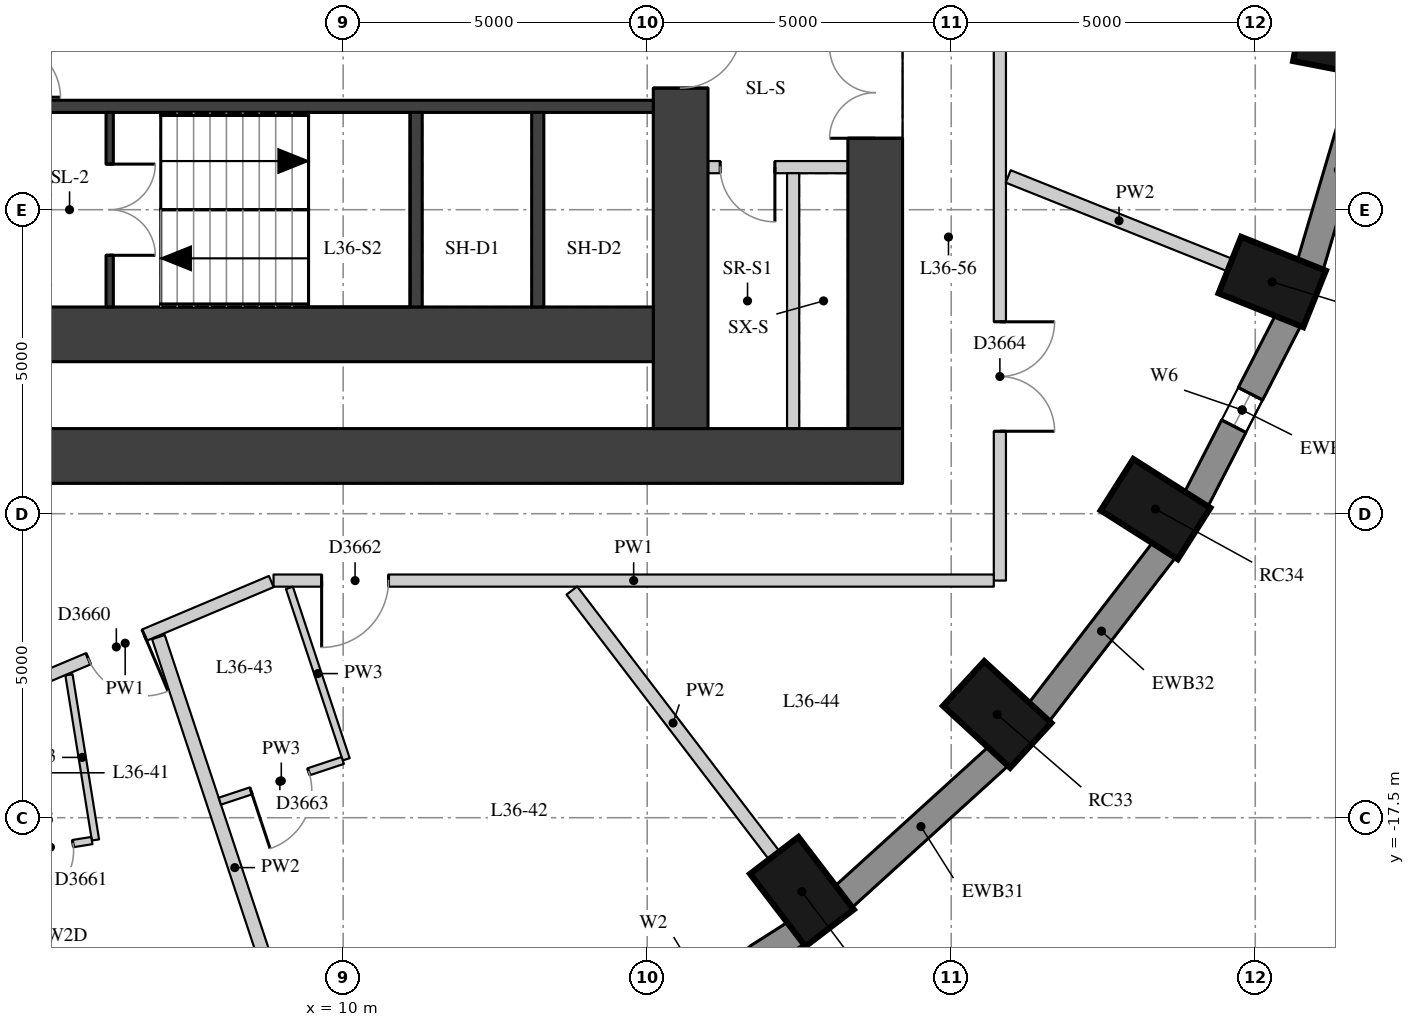
"""IFC4 building model, lengths in metres.
Left out: names, types, materials, properties, quantities, classifications, styles, units other than length and angle.
Written with IfcOpenShell. Run it as: python <this file> out.ifc"""

import sys

from ifc_helpers import new_model, si_unit, direction, frame, frame_2d, origin, origin_2d, place, context, subcontext, project, spatial, rectangle, extrude, element, fill, save


model = new_model("IFC4")
c1 = context("Model", 3, precision=1e-05, world=origin(), true_north=direction((0.0, 1.0)))
c2 = subcontext(c1, "Body", "Model", "MODEL_VIEW")
j1 = project(units=[si_unit("LENGTHUNIT", "METRE"), si_unit("PLANEANGLEUNIT", "RADIAN")], contexts=[c1])
p1 = place(None, origin())
s1 = spatial("IfcSite", under=j1, at=p1, CompositionType="ELEMENT")
p2 = place(p1, origin())
s2 = spatial("IfcBuilding", under=s1, at=p2, CompositionType="ELEMENT")
p3 = place(p2, frame((0.0, 0.0, 128.5)))
s3 = spatial("IfcBuildingStorey", under=s2, at=p3, CompositionType="ELEMENT", Elevation=128.5)
for number, where, z_axis, x_axis in (
    (1, (17.545, -18.717, 0.0), (0.0, 0.0, 1.0), (0.607, -0.795, 0.0)),
    (2, (20.755, -15.802, 0.0), (0.0, 0.0, 1.0), (0.735, -0.678, 0.0)),
    (3, (23.36, -12.425, 0.0), (0.0, 0.0, 1.0), (0.845, -0.536, 0.0)),
    (4, (25.279, -8.689, 0.0), (0.0, 0.0, 1.0), (0.929, -0.371, 0.0)),
    (5, (26.454, -4.707, 0.0), (0.0, 0.0, 1.0), (0.982, -0.19, 0.0)),
):
    element("IfcColumn", number, at=place(p3, frame(where, z_axis=z_axis, x_axis=x_axis)), inside=s3, PredefinedType="COLUMN", context=c2, shape_type="SweptSolid", body=[
        extrude(rectangle(XDim=1.5, YDim=1.0, at=origin_2d()), origin(), (0.0, 0.0, 1.0), 3.3),
    ])
p4 = place(p3, frame((14.475, -21.287, 0.0), z_axis=(0.0, 0.0, 1.0), x_axis=(0.843911841423, 0.536481876587, 0.0)))
e6 = element("IfcWall", 6, at=p4, inside=s3, PredefinedType="SOLIDWALL", context=c2, shape_type="SweptSolid", body=[
    extrude(rectangle(XDim=3.532, YDim=0.45, at=frame_2d((1.766, 0.0))), origin(), (0.0, 0.0, 1.0), 3.02),
])
p5 = place(p4, frame((0.766, 0.0, 0.4)))
e7 = element("IfcOpeningElement", 7, at=p5, cuts=e6, PredefinedType="OPENING", context=c2, shape_type="SweptSolid", body=[
    extrude(rectangle(XDim=2.0, YDim=1.75, at=frame_2d((1.0, 0.875))), frame((0.0, 0.235, 0.0), z_axis=(0.0, -1.0, 0.0), x_axis=(1.0, 0.0, 0.0)), (0.0, 0.0, 1.0), 0.47),
])
p6 = place(p3, frame((18.219, -18.81, 0.0), z_axis=(0.0, 0.0, 1.0), x_axis=(0.740364106106, 0.672206062446, 0.0)))
e8 = element("IfcWall", 8, at=p6, inside=s3, PredefinedType="SOLIDWALL", context=c2, shape_type="SweptSolid", body=[
    extrude(rectangle(XDim=3.464, YDim=0.45, at=frame_2d((1.732, 0.0))), origin(), (0.0, 0.0, 1.0), 3.02),
])
p7 = place(p3, frame((21.435, -15.775, 0.0), z_axis=(0.0, 0.0, 1.0), x_axis=(0.610693945156, 0.791866721961, 0.0)))
e9 = element("IfcWall", 9, at=p7, inside=s3, PredefinedType="SOLIDWALL", context=c2, shape_type="SweptSolid", body=[
    extrude(rectangle(XDim=3.395, YDim=0.45, at=frame_2d((1.697, 0.0))), origin(), (0.0, 0.0, 1.0), 3.02),
])
p8 = place(p3, frame((24.023, -12.277, 0.0), z_axis=(0.0, 0.0, 1.0), x_axis=(0.456828186229, 0.889554949549, 0.0)))
e10 = element("IfcWall", 10, at=p8, inside=s3, PredefinedType="SOLIDWALL", context=c2, shape_type="SweptSolid", body=[
    extrude(rectangle(XDim=3.333, YDim=0.45, at=frame_2d((1.667, 0.0))), origin(), (0.0, 0.0, 1.0), 3.02),
])
p9 = place(p8, frame((1.366, 0.0, 0.4)))
e11 = element("IfcOpeningElement", 11, at=p9, cuts=e10, PredefinedType="OPENING", context=c2, shape_type="SweptSolid", body=[
    extrude(rectangle(XDim=0.6, YDim=1.75, at=frame_2d((0.3, 0.875))), frame((0.0, 0.235, 0.0), z_axis=(0.0, -1.0, 0.0), x_axis=(1.0, 0.0, 0.0)), (0.0, 0.0, 1.0), 0.47),
])
p10 = place(p3, frame((25.902, -8.421, 0.0), z_axis=(0.0, 0.0, 1.0), x_axis=(0.282982737009, 0.95912500257, 0.0)))
e12 = element("IfcWall", 12, at=p10, inside=s3, PredefinedType="SOLIDWALL", context=c2, shape_type="SweptSolid", body=[
    extrude(rectangle(XDim=3.286, YDim=0.45, at=frame_2d((1.643, 0.0))), origin(), (0.0, 0.0, 1.0), 3.02),
])
p11 = place(p3, frame((18.75, -11.1, 0.0), z_axis=(0.0, 0.0, 1.0), x_axis=(0.0, 1.0, 0.0)))
e13 = element("IfcWall", 13, at=p11, inside=s3, PredefinedType="SHEAR", context=c2, shape_type="SweptSolid", body=[
    extrude(rectangle(XDim=22.2, YDim=0.9, at=frame_2d((11.1, 0.0))), origin(), (0.0, 0.0, 1.0), 3.02),
])
p12 = place(p11, frame((15.675, 0.0, 0.0)))
e14 = element("IfcOpeningElement", 14, at=p12, cuts=e13, PredefinedType="OPENING", context=c2, shape_type="SweptSolid", body=[
    extrude(rectangle(XDim=1.5, YDim=2.1, at=frame_2d((0.75, 1.05))), frame((0.0, 0.46, 0.0), z_axis=(0.0, -1.0, 0.0), x_axis=(1.0, 0.0, 0.0)), (0.0, 0.0, 1.0), 0.92),
])
p13 = place(p11, frame((4.775, 0.0, 0.0)))
e15 = element("IfcOpeningElement", 15, at=p13, cuts=e13, PredefinedType="OPENING", context=c2, shape_type="SweptSolid", body=[
    extrude(rectangle(XDim=1.5, YDim=2.1, at=frame_2d((0.75, 1.05))), frame((0.0, 0.46, 0.0), z_axis=(0.0, -1.0, 0.0), x_axis=(1.0, 0.0, 0.0)), (0.0, 0.0, 1.0), 0.92),
])
p14 = place(p3, frame((4.0, -11.55, 0.0), z_axis=(0.0, 0.0, 1.0), x_axis=(1.0, 0.0, 0.0)))
e16 = element("IfcWall", 16, at=p14, inside=s3, PredefinedType="SHEAR", context=c2, shape_type="SweptSolid", body=[
    extrude(rectangle(XDim=15.2, YDim=0.9, at=frame_2d((7.6, 0.0))), origin(), (0.0, 0.0, 1.0), 3.02),
])
p15 = place(p3, frame((15.55, -11.1, 0.0), z_axis=(0.0, 0.0, 1.0), x_axis=(0.0, 1.0, 0.0)))
e17 = element("IfcWall", 17, at=p15, inside=s3, PredefinedType="SHEAR", context=c2, shape_type="SweptSolid", body=[
    extrude(rectangle(XDim=22.2, YDim=0.9, at=frame_2d((11.1, 0.0))), origin(), (0.0, 0.0, 1.0), 3.02),
])
p16 = place(p15, frame((15.6, 0.0, 0.0)))
e18 = element("IfcOpeningElement", 18, at=p16, cuts=e17, PredefinedType="OPENING", context=c2, shape_type="SweptSolid", body=[
    extrude(rectangle(XDim=1.0, YDim=2.1, at=frame_2d((0.5, 1.05))), frame((0.0, 0.46, 0.0), z_axis=(0.0, -1.0, 0.0), x_axis=(1.0, 0.0, 0.0)), (0.0, 0.0, 1.0), 0.92),
])
p17 = place(p15, frame((5.6, 0.0, 0.0)))
e19 = element("IfcOpeningElement", 19, at=p17, cuts=e17, PredefinedType="OPENING", context=c2, shape_type="SweptSolid", body=[
    extrude(rectangle(XDim=1.0, YDim=2.1, at=frame_2d((0.5, 1.05))), frame((0.0, 0.46, 0.0), z_axis=(0.0, -1.0, 0.0), x_axis=(1.0, 0.0, 0.0)), (0.0, 0.0, 1.0), 0.92),
])
p18 = place(p3, frame((4.9, -9.55, 0.0), z_axis=(0.0, 0.0, 1.0), x_axis=(1.0, 0.0, 0.0)))
e20 = element("IfcWall", 20, at=p18, inside=s3, PredefinedType="SHEAR", context=c2, shape_type="SweptSolid", body=[
    extrude(rectangle(XDim=10.2, YDim=0.9, at=frame_2d((5.1, 0.0))), origin(), (0.0, 0.0, 1.0), 3.02),
])
p19 = place(p3, frame((4.9, -5.8, 0.0), z_axis=(0.0, 0.0, 1.0), x_axis=(1.0, 0.0, 0.0)))
e21 = element("IfcWall", 21, at=p19, inside=s3, PredefinedType="SHEAR", context=c2, shape_type="SweptSolid", body=[
    extrude(rectangle(XDim=10.2, YDim=0.2, at=frame_2d((5.1, 0.0))), origin(), (0.0, 0.0, 1.0), 3.02),
])
for number, where, z_axis, x_axis in (
    (22, (11.2, -9.1, 0.0), (0.0, 0.0, 1.0), (0.0, 1.0, 0.0)),
    (23, (13.2, -9.1, 0.0), (0.0, 0.0, 1.0), (0.0, 1.0, 0.0)),
):
    element("IfcWall", number, at=place(p3, frame(where, z_axis=z_axis, x_axis=x_axis)), inside=s3, PredefinedType="SHEAR", context=c2, shape_type="SweptSolid", body=[
        extrude(rectangle(XDim=3.2, YDim=0.2, at=frame_2d((1.6, 0.0))), origin(), (0.0, 0.0, 1.0), 3.02),
    ])
p20 = place(p3, frame((6.16, -9.1, 0.0), z_axis=(0.0, 0.0, 1.0), x_axis=(0.0, 1.0, 0.0)))
e24 = element("IfcWall", 24, at=p20, inside=s3, PredefinedType="SHEAR", context=c2, shape_type="SweptSolid", body=[
    extrude(rectangle(XDim=3.2, YDim=0.12, at=frame_2d((1.6, 0.0))), origin(), (0.0, 0.0, 1.0), 3.02),
])
p21 = place(p20, frame((0.85, 0.0, 0.0)))
e25 = element("IfcOpeningElement", 25, at=p21, cuts=e24, PredefinedType="OPENING", context=c2, shape_type="SweptSolid", body=[
    extrude(rectangle(XDim=1.5, YDim=2.1, at=frame_2d((0.75, 1.05))), frame((0.0, 0.07, 0.0), z_axis=(0.0, -1.0, 0.0), x_axis=(1.0, 0.0, 0.0)), (0.0, 0.0, 1.0), 0.14),
])
p22 = place(p3, frame((16.0, -6.8, 0.0), z_axis=(0.0, 0.0, 1.0), x_axis=(1.0, 0.0, 0.0)))
e26 = element("IfcWall", 26, at=p22, inside=s3, PredefinedType="PARTITIONING", context=c2, shape_type="SweptSolid", body=[
    extrude(rectangle(XDim=2.3, YDim=0.2, at=frame_2d((1.15, 0.0))), origin(), (0.0, 0.0, 1.0), 3.02),
])
p23 = place(p22, frame((0.2, 0.0, 0.0)))
e27 = element("IfcOpeningElement", 27, at=p23, cuts=e26, PredefinedType="OPENING", context=c2, shape_type="SweptSolid", body=[
    extrude(rectangle(XDim=0.9, YDim=2.1, at=frame_2d((0.45, 1.05))), frame((0.0, 0.11, 0.0), z_axis=(0.0, -1.0, 0.0), x_axis=(1.0, 0.0, 0.0)), (0.0, 0.0, 1.0), 0.22),
])
p24 = place(p3, frame((17.4, -11.1, 0.0), z_axis=(0.0, 0.0, 1.0), x_axis=(0.0, 1.0, 0.0)))
e28 = element("IfcWall", 28, at=p24, inside=s3, PredefinedType="PARTITIONING", context=c2, shape_type="SweptSolid", body=[
    extrude(rectangle(XDim=4.2, YDim=0.2, at=frame_2d((2.1, 0.0))), origin(), (0.0, 0.0, 1.0), 3.02),
])
p25 = place(p3, frame((20.8, 13.5, 0.0), z_axis=(0.0, 0.0, 1.0), x_axis=(0.0, -1.0, 0.0)))
e29 = element("IfcWall", 29, at=p25, inside=s3, PredefinedType="PARTITIONING", context=c2, shape_type="SweptSolid", body=[
    extrude(rectangle(XDim=27.1, YDim=0.2, at=frame_2d((13.55, 0.0))), origin(), (0.0, 0.0, 1.0), 3.02),
])
p26 = place(p25, frame((22.844, 0.0, 0.0)))
e30 = element("IfcOpeningElement", 30, at=p26, cuts=e29, PredefinedType="OPENING", context=c2, shape_type="SweptSolid", body=[
    extrude(rectangle(XDim=1.8, YDim=2.1, at=frame_2d((0.9, 1.05))), frame((0.0, 0.11, 0.0), z_axis=(0.0, -1.0, 0.0), x_axis=(1.0, 0.0, 0.0)), (0.0, 0.0, 1.0), 0.22),
])
p27 = place(p25, frame((16.35, 0.0, 0.0)))
e31 = element("IfcOpeningElement", 31, at=p27, cuts=e29, PredefinedType="OPENING", context=c2, shape_type="SweptSolid", body=[
    extrude(rectangle(XDim=1.8, YDim=2.1, at=frame_2d((0.9, 1.05))), frame((0.0, 0.11, 0.0), z_axis=(0.0, -1.0, 0.0), x_axis=(1.0, 0.0, 0.0)), (0.0, 0.0, 1.0), 0.22),
])
p28 = place(p25, frame((10.051, 0.0, 0.0)))
e32 = element("IfcOpeningElement", 32, at=p28, cuts=e29, PredefinedType="OPENING", context=c2, shape_type="SweptSolid", body=[
    extrude(rectangle(XDim=1.8, YDim=2.1, at=frame_2d((0.9, 1.05))), frame((0.0, 0.11, 0.0), z_axis=(0.0, -1.0, 0.0), x_axis=(1.0, 0.0, 0.0)), (0.0, 0.0, 1.0), 0.22),
])
p29 = place(p3, frame((20.7, -13.6, 0.0), z_axis=(0.0, 0.0, 1.0), x_axis=(-1.0, 0.0, 0.0)))
e33 = element("IfcWall", 33, at=p29, inside=s3, PredefinedType="PARTITIONING", context=c2, shape_type="SweptSolid", body=[
    extrude(rectangle(XDim=11.845, YDim=0.2, at=frame_2d((5.923, 0.0))), origin(), (0.0, 0.0, 1.0), 3.02),
])
p30 = place(p29, frame((9.954, 0.0, 0.0)))
e34 = element("IfcOpeningElement", 34, at=p30, cuts=e33, PredefinedType="OPENING", context=c2, shape_type="SweptSolid", body=[
    extrude(rectangle(XDim=1.1, YDim=2.1, at=frame_2d((0.55, 1.05))), frame((0.0, 0.11, 0.0), z_axis=(0.0, -1.0, 0.0), x_axis=(1.0, 0.0, 0.0)), (0.0, 0.0, 1.0), 0.22),
])
p31 = place(p3, frame((8.818, -13.616, 0.0), z_axis=(0.0, 0.0, 1.0), x_axis=(-0.921304705085, -0.388841407759, 0.0)))
e35 = element("IfcWall", 35, at=p31, inside=s3, PredefinedType="PARTITIONING", context=c2, shape_type="SweptSolid", body=[
    extrude(rectangle(XDim=5.217, YDim=0.2, at=frame_2d((2.608, 0.0))), origin(), (0.0, 0.0, 1.0), 3.02),
])
p32 = place(p31, frame((2.266, 0.0, 0.0)))
e36 = element("IfcOpeningElement", 36, at=p32, cuts=e35, PredefinedType="OPENING", context=c2, shape_type="SweptSolid", body=[
    extrude(rectangle(XDim=1.0, YDim=2.1, at=frame_2d((0.5, 1.05))), frame((0.0, 0.11, 0.0), z_axis=(0.0, -1.0, 0.0), x_axis=(1.0, 0.0, 0.0)), (0.0, 0.0, 1.0), 0.22),
])
p33 = place(p3, frame((5.205, -23.15, 0.0), z_axis=(0.0, 0.0, 1.0), x_axis=(-0.15850394357, 0.987358344206, 0.0)))
e37 = element("IfcWall", 37, at=p33, inside=s3, PredefinedType="PARTITIONING", context=c2, shape_type="SweptSolid", body=[
    extrude(rectangle(XDim=7.492, YDim=0.22, at=frame_2d((3.746, 0.0))), origin(), (0.0, 0.0, 1.0), 2.47),
])
p34 = place(p3, frame((9.474, -22.112, 0.0), z_axis=(0.0, 0.0, 1.0), x_axis=(-0.314540101072, 0.949244186086, 0.0)))
e38 = element("IfcWall", 38, at=p34, inside=s3, PredefinedType="PARTITIONING", context=c2, shape_type="SweptSolid", body=[
    extrude(rectangle(XDim=7.988, YDim=0.22, at=frame_2d((3.994, 0.0))), origin(), (0.0, 0.0, 1.0), 3.02),
])
p35 = place(p3, frame((17.089, -18.121, 0.0), z_axis=(0.0, 0.0, 1.0), x_axis=(-0.607064955951, 0.794652212767, 0.0)))
e39 = element("IfcWall", 39, at=p35, inside=s3, PredefinedType="PARTITIONING", context=c2, shape_type="SweptSolid", body=[
    extrude(rectangle(XDim=5.483, YDim=0.22, at=frame_2d((2.742, 0.0))), origin(), (0.0, 0.0, 1.0), 3.02),
])
p36 = place(p3, frame((24.583, -8.41, 0.0), z_axis=(0.0, 0.0, 1.0), x_axis=(-0.928528147853, 0.371262008083, 0.0)))
e40 = element("IfcWall", 40, at=p36, inside=s3, PredefinedType="PARTITIONING", context=c2, shape_type="SweptSolid", body=[
    extrude(rectangle(XDim=3.926, YDim=0.22, at=frame_2d((1.963, 0.0))), origin(), (0.0, 0.0, 1.0), 3.02),
])
p37 = place(p3, frame((5.49, -15.15, 0.0), z_axis=(0.0, 0.0, 1.0), x_axis=(0.158495805849, -0.987359650547, 0.0)))
e41 = element("IfcWall", 41, at=p37, inside=s3, PredefinedType="PARTITIONING", context=c2, shape_type="SweptSolid", body=[
    extrude(rectangle(XDim=2.751, YDim=0.12, at=frame_2d((1.375, 0.0))), origin(), (0.0, 0.0, 1.0), 3.02),
])
p38 = place(p3, frame((9.116, -13.719, 0.0), z_axis=(0.0, 0.0, 1.0), x_axis=(0.314476938086, -0.949265113344, 0.0)))
e42 = element("IfcWall", 42, at=p38, inside=s3, PredefinedType="PARTITIONING", context=c2, shape_type="SweptSolid", body=[
    extrude(rectangle(XDim=2.971, YDim=0.12, at=frame_2d((1.485, 0.0))), origin(), (0.0, 0.0, 1.0), 3.02),
])
p39 = place(p3, frame((5.867, -17.876, 0.0), z_axis=(0.0, 0.0, 1.0), x_axis=(-0.98735658966, -0.158514872664, 0.0)))
e43 = element("IfcWall", 43, at=p39, inside=s3, PredefinedType="PARTITIONING", context=c2, shape_type="SweptSolid", body=[
    extrude(rectangle(XDim=1.38, YDim=0.12, at=frame_2d((0.69, 0.0))), origin(), (0.0, 0.0, 1.0), 3.02),
])
p40 = place(p39, frame((0.315, 0.0, 0.0)))
e44 = element("IfcOpeningElement", 44, at=p40, cuts=e43, PredefinedType="OPENING", context=c2, shape_type="SweptSolid", body=[
    extrude(rectangle(XDim=0.8, YDim=2.1, at=frame_2d((0.4, 1.05))), frame((0.0, 0.07, 0.0), z_axis=(0.0, -1.0, 0.0), x_axis=(1.0, 0.0, 0.0)), (0.0, 0.0, 1.0), 0.14),
])
p41 = place(p3, frame((9.993, -16.559, 0.0), z_axis=(0.0, 0.0, 1.0), x_axis=(-0.94926636949, -0.314473146318, 0.0)))
e45 = element("IfcWall", 45, at=p41, inside=s3, PredefinedType="PARTITIONING", context=c2, shape_type="SweptSolid", body=[
    extrude(rectangle(XDim=2.13, YDim=0.12, at=frame_2d((1.065, 0.0))), origin(), (0.0, 0.0, 1.0), 3.02),
])
p42 = place(p41, frame((0.59, 0.0, 0.0)))
e46 = element("IfcOpeningElement", 46, at=p42, cuts=e45, PredefinedType="OPENING", context=c2, shape_type="SweptSolid", body=[
    extrude(rectangle(XDim=1.0, YDim=2.1, at=frame_2d((0.5, 1.05))), frame((0.0, 0.07, 0.0), z_axis=(0.0, -1.0, 0.0), x_axis=(1.0, 0.0, 0.0)), (0.0, 0.0, 1.0), 0.14),
])
p43 = place(p9, origin())
e47 = element("IfcWindow", 47, at=p43, inside=s3, PartitioningType="SINGLE_PANEL", PredefinedType="WINDOW", context=c2, shape_type="SweptSolid", body=[
    extrude(rectangle(XDim=0.6, YDim=1.75, at=frame_2d((0.3, 0.875))), frame((0.0, 0.035, 0.0), z_axis=(0.0, -1.0, 0.0), x_axis=(1.0, 0.0, 0.0)), (0.0, 0.0, 1.0), 0.06),
])
fill(e11, e47)
p44 = place(p13, origin())
e48 = element("IfcDoor", 48, at=p44, inside=s3, OperationType="DOUBLE_DOOR_SINGLE_SWING", PredefinedType="DOOR", context=c2, shape_type="SweptSolid", body=[
    extrude(rectangle(XDim=1.5, YDim=2.1, at=frame_2d((0.75, 1.05))), frame((0.0, 0.025, 0.0), z_axis=(0.0, -1.0, 0.0), x_axis=(1.0, 0.0, 0.0)), (0.0, 0.0, 1.0), 0.05),
])
fill(e15, e48)
p45 = place(p21, origin())
e49 = element("IfcDoor", 49, at=p45, inside=s3, OperationType="DOUBLE_DOOR_SINGLE_SWING", PredefinedType="DOOR", context=c2, shape_type="SweptSolid", body=[
    extrude(rectangle(XDim=1.5, YDim=2.1, at=frame_2d((0.75, 1.05))), frame((0.0, 0.025, 0.0), z_axis=(0.0, -1.0, 0.0), x_axis=(1.0, 0.0, 0.0)), (0.0, 0.0, 1.0), 0.05),
])
fill(e25, e49)
p46 = place(p17, origin())
e50 = element("IfcDoor", 50, at=p46, inside=s3, OperationType="SINGLE_SWING_LEFT", PredefinedType="DOOR", context=c2, shape_type="SweptSolid", body=[
    extrude(rectangle(XDim=1.0, YDim=2.1, at=frame_2d((0.5, 1.05))), frame((0.0, 0.025, 0.0), z_axis=(0.0, -1.0, 0.0), x_axis=(1.0, 0.0, 0.0)), (0.0, 0.0, 1.0), 0.05),
])
fill(e19, e50)
p47 = place(p23, origin())
e51 = element("IfcDoor", 51, at=p47, inside=s3, OperationType="SINGLE_SWING_LEFT", PredefinedType="DOOR", context=c2, shape_type="SweptSolid", body=[
    extrude(rectangle(XDim=0.9, YDim=2.1, at=frame_2d((0.45, 1.05))), frame((0.0, 0.025, 0.0), z_axis=(0.0, -1.0, 0.0), x_axis=(1.0, 0.0, 0.0)), (0.0, 0.0, 1.0), 0.05),
])
fill(e27, e51)
p48 = place(p32, origin())
e52 = element("IfcDoor", 52, at=p48, inside=s3, OperationType="SINGLE_SWING_LEFT", PredefinedType="DOOR", context=c2, shape_type="SweptSolid", body=[
    extrude(rectangle(XDim=1.0, YDim=2.1, at=frame_2d((0.5, 1.05))), frame((0.0, 0.025, 0.0), z_axis=(0.0, -1.0, 0.0), x_axis=(1.0, 0.0, 0.0)), (0.0, 0.0, 1.0), 0.05),
])
fill(e36, e52)
p49 = place(p40, origin())
e53 = element("IfcDoor", 53, at=p49, inside=s3, OperationType="SINGLE_SWING_RIGHT", PredefinedType="DOOR", context=c2, shape_type="SweptSolid", body=[
    extrude(rectangle(XDim=0.8, YDim=2.1, at=frame_2d((0.4, 1.05))), frame((0.0, 0.025, 0.0), z_axis=(0.0, -1.0, 0.0), x_axis=(1.0, 0.0, 0.0)), (0.0, 0.0, 1.0), 0.05),
])
fill(e44, e53)
p50 = place(p30, origin())
e54 = element("IfcDoor", 54, at=p50, inside=s3, OperationType="SINGLE_SWING_RIGHT", PredefinedType="DOOR", context=c2, shape_type="SweptSolid", body=[
    extrude(rectangle(XDim=1.1, YDim=2.1, at=frame_2d((0.55, 1.05))), frame((0.0, 0.025, 0.0), z_axis=(0.0, -1.0, 0.0), x_axis=(1.0, 0.0, 0.0)), (0.0, 0.0, 1.0), 0.05),
])
fill(e34, e54)
p51 = place(p42, origin())
e55 = element("IfcDoor", 55, at=p51, inside=s3, OperationType="SINGLE_SWING_RIGHT", PredefinedType="DOOR", context=c2, shape_type="SweptSolid", body=[
    extrude(rectangle(XDim=1.0, YDim=2.1, at=frame_2d((0.5, 1.05))), frame((0.0, 0.025, 0.0), z_axis=(0.0, -1.0, 0.0), x_axis=(1.0, 0.0, 0.0)), (0.0, 0.0, 1.0), 0.05),
])
fill(e46, e55)
p52 = place(p26, origin())
e56 = element("IfcDoor", 56, at=p52, inside=s3, OperationType="DOUBLE_DOOR_SINGLE_SWING", PredefinedType="DOOR", context=c2, shape_type="SweptSolid", body=[
    extrude(rectangle(XDim=1.8, YDim=2.1, at=frame_2d((0.9, 1.05))), frame((0.0, 0.025, 0.0), z_axis=(0.0, -1.0, 0.0), x_axis=(1.0, 0.0, 0.0)), (0.0, 0.0, 1.0), 0.05),
])
fill(e30, e56)
save(model, sys.argv[1])
